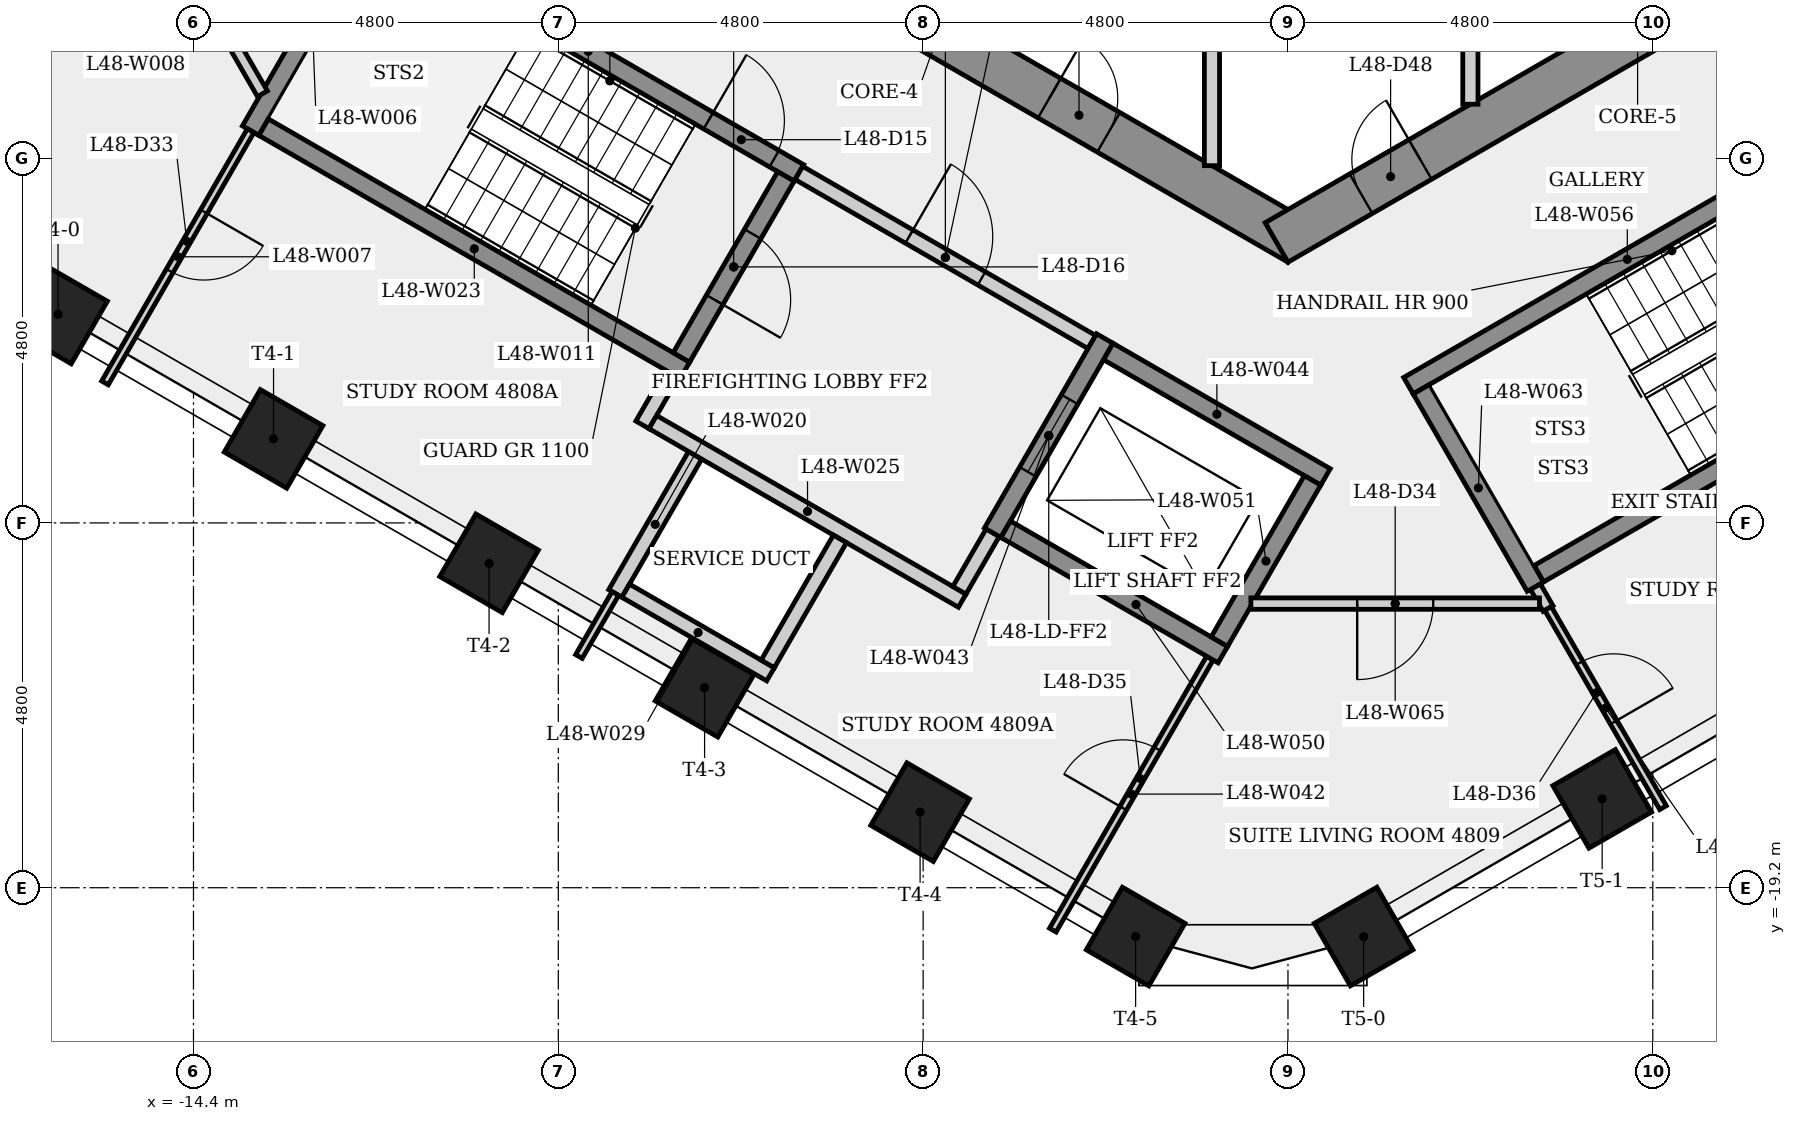
"""IFC4 building model, lengths in metres.
Left out: names, types, materials, properties, quantities, classifications, styles, units other than length and angle.
Written with IfcOpenShell. Run it as: python <this file> out.ifc"""

import sys

from ifc_helpers import new_model, si_unit, direction, frame, frame_2d, origin, origin_2d, place, context, subcontext, project, spatial, rectangle, extrude, element, fill, save


model = new_model("IFC4")
c1 = context("Model", 3, precision=1e-05, world=origin(), true_north=direction((0.0, 1.0)))
c2 = subcontext(c1, "Body", "Model", "MODEL_VIEW")
j1 = project(units=[si_unit("LENGTHUNIT", "METRE"), si_unit("PLANEANGLEUNIT", "RADIAN")], contexts=[c1])
p1 = place(None, origin())
s1 = spatial("IfcSite", under=j1, at=p1, CompositionType="ELEMENT")
p2 = place(p1, origin())
s2 = spatial("IfcBuilding", under=s1, at=p2, CompositionType="ELEMENT")
p3 = place(p2, frame((0.0, 0.0, 179.9)))
s3 = spatial("IfcBuildingStorey", under=s2, at=p3, CompositionType="ELEMENT", Elevation=179.9)
p4 = place(p3, frame((-9.35, -5.225, 0.0), z_axis=(0.0, 0.0, 1.0), x_axis=(0.866023993627, -0.500002442456, 0.0)))
e1 = element("IfcWall", 1, at=p4, inside=s3, PredefinedType="SHEAR", context=c2, shape_type="SweptSolid", body=[
    extrude(rectangle(XDim=10.97, YDim=0.6, at=frame_2d((5.485, 0.0))), origin(), (0.0, 0.0, 1.0), 3.4),
])
p5 = place(p4, frame((2.622, 0.0, 0.0)))
e2 = element("IfcOpeningElement", 2, at=p5, cuts=e1, PredefinedType="OPENING", context=c2, shape_type="SweptSolid", body=[
    extrude(rectangle(XDim=0.9, YDim=2.1, at=frame_2d((0.45, 1.05))), frame((0.0, 0.31, 0.0), z_axis=(0.0, -1.0, 0.0), x_axis=(1.0, 0.0, 0.0)), (0.0, 0.0, 1.0), 0.62),
])
p6 = place(p4, frame((7.172, 0.0, 0.0)))
e3 = element("IfcOpeningElement", 3, at=p6, cuts=e1, PredefinedType="OPENING", context=c2, shape_type="SweptSolid", body=[
    extrude(rectangle(XDim=0.9, YDim=2.1, at=frame_2d((0.45, 1.05))), frame((0.0, 0.31, 0.0), z_axis=(0.0, -1.0, 0.0), x_axis=(1.0, 0.0, 0.0)), (0.0, 0.0, 1.0), 0.62),
])
p7 = place(p3, frame((-0.15, -10.71, 0.0), z_axis=(0.0, 0.0, 1.0), x_axis=(0.866023993627, 0.500002442456, 0.0)))
e4 = element("IfcWall", 4, at=p7, inside=s3, PredefinedType="SHEAR", context=c2, shape_type="SweptSolid", body=[
    extrude(rectangle(XDim=10.97, YDim=0.6, at=frame_2d((5.485, 0.0))), origin(), (0.0, 0.0, 1.0), 3.4),
])
p8 = place(p7, frame((1.283, 0.0, 0.0)))
e5 = element("IfcOpeningElement", 5, at=p8, cuts=e4, PredefinedType="OPENING", context=c2, shape_type="SweptSolid", body=[
    extrude(rectangle(XDim=0.9, YDim=2.1, at=frame_2d((0.45, 1.05))), frame((0.0, 0.31, 0.0), z_axis=(0.0, -1.0, 0.0), x_axis=(1.0, 0.0, 0.0)), (0.0, 0.0, 1.0), 0.62),
])
p9 = place(p7, frame((8.09, 0.0, 0.0)))
e6 = element("IfcOpeningElement", 6, at=p9, cuts=e4, PredefinedType="OPENING", context=c2, shape_type="SweptSolid", body=[
    extrude(rectangle(XDim=0.9, YDim=2.1, at=frame_2d((0.45, 1.05))), frame((0.0, 0.31, 0.0), z_axis=(0.0, -1.0, 0.0), x_axis=(1.0, 0.0, 0.0)), (0.0, 0.0, 1.0), 0.62),
])
for number, where, z_axis, x_axis in (
    (7, (-16.182, -11.657, 0.0), (0.0, 0.0, 1.0), (-0.5, -0.866, 0.0)),
    (8, (-13.346, -13.294, 0.0), (0.0, 0.0, 1.0), (-0.5, -0.866, 0.0)),
    (9, (-10.511, -14.931, 0.0), (0.0, 0.0, 1.0), (-0.5, -0.866, 0.0)),
    (10, (-7.676, -16.569, 0.0), (0.0, 0.0, 1.0), (-0.5, -0.866, 0.0)),
    (11, (-4.84, -18.206, 0.0), (0.0, 0.0, 1.0), (-0.5, -0.866, 0.0)),
    (12, (-2.004, -19.843, 0.0), (0.0, 0.0, 1.0), (-0.5, -0.866, 0.0)),
    (13, (0.996, -19.843, 0.0), (0.0, 0.0, 1.0), (0.5, -0.866, 0.0)),
    (14, (4.134, -18.031, 0.0), (0.0, 0.0, 1.0), (0.5, -0.866, 0.0)),
):
    element("IfcColumn", number, at=place(p3, frame(where, z_axis=z_axis, x_axis=x_axis)), inside=s3, PredefinedType="COLUMN", context=c2, shape_type="SweptSolid", body=[
        extrude(rectangle(XDim=0.95, YDim=0.95, at=origin_2d()), origin(), (0.0, 0.0, 1.0), 3.4),
    ])
p10 = place(p3, frame((-13.648, -9.239, 0.0), z_axis=(0.0, 0.0, 1.0), x_axis=(0.500017246033, 0.866015446554, 0.0)))
e15 = element("IfcWall", 15, at=p10, inside=s3, PredefinedType="SHEAR", context=c2, shape_type="SweptSolid", body=[
    extrude(rectangle(XDim=3.25, YDim=0.25, at=frame_2d((1.625, 0.0))), origin(), (0.0, 0.0, 1.0), 3.05),
])
p11 = place(p3, frame((-13.648, -9.239, 0.0), z_axis=(0.0, 0.0, 1.0), x_axis=(-0.500044099915, -0.86599994119, 0.0)))
e16 = element("IfcWall", 16, at=p11, inside=s3, PredefinedType="PARTITIONING", context=c2, shape_type="SweptSolid", body=[
    extrude(rectangle(XDim=3.833, YDim=0.1, at=frame_2d((1.917, 0.0))), origin(), (0.0, 0.0, 1.0), 3.05),
])
p12 = place(p11, frame((1.231, 0.0, 0.0)))
e17 = element("IfcOpeningElement", 17, at=p12, cuts=e16, PredefinedType="OPENING", context=c2, shape_type="SweptSolid", body=[
    extrude(rectangle(XDim=0.9, YDim=2.1, at=frame_2d((0.45, 1.05))), frame((0.0, 0.06, 0.0), z_axis=(0.0, -1.0, 0.0), x_axis=(1.0, 0.0, 0.0)), (0.0, 0.0, 1.0), 0.12),
])
p13 = place(p3, frame((-13.493, -8.753, 0.0), z_axis=(0.0, 0.0, 1.0), x_axis=(-0.500006623535, 0.866021579651, 0.0)))
e18 = element("IfcWall", 18, at=p13, inside=s3, PredefinedType="PARTITIONING", context=c2, shape_type="SweptSolid", body=[
    extrude(rectangle(XDim=3.768, YDim=0.15, at=frame_2d((1.884, 0.0))), origin(), (0.0, 0.0, 1.0), 3.05),
])
p14 = place(p13, frame((1.384, 0.0, 0.0)))
e19 = element("IfcOpeningElement", 19, at=p14, cuts=e18, PredefinedType="OPENING", context=c2, shape_type="SweptSolid", body=[
    extrude(rectangle(XDim=1.0, YDim=2.1, at=frame_2d((0.5, 1.05))), frame((0.0, 0.085, 0.0), z_axis=(0.0, -1.0, 0.0), x_axis=(1.0, 0.0, 0.0)), (0.0, 0.0, 1.0), 0.17),
])
p15 = place(p3, frame((-11.977, -6.595, 0.0), z_axis=(0.0, 0.0, 1.0), x_axis=(0.866025499775, -0.499999833739, 0.0)))
e20 = element("IfcWall", 20, at=p15, inside=s3, PredefinedType="SHEAR", context=c2, shape_type="SweptSolid", body=[
    extrude(rectangle(XDim=6.4, YDim=0.25, at=frame_2d((3.2, 0.0))), origin(), (0.0, 0.0, 1.0), 3.05),
])
p16 = place(p15, frame((5.025, 0.0, 0.0)))
e21 = element("IfcOpeningElement", 21, at=p16, cuts=e20, PredefinedType="OPENING", context=c2, shape_type="SweptSolid", body=[
    extrude(rectangle(XDim=1.0, YDim=2.1, at=frame_2d((0.5, 1.05))), frame((0.0, 0.135, 0.0), z_axis=(0.0, -1.0, 0.0), x_axis=(1.0, 0.0, 0.0)), (0.0, 0.0, 1.0), 0.27),
])
p17 = place(p3, frame((-8.85, -15.329, 0.0), z_axis=(0.0, 0.0, 1.0), x_axis=(0.500027713859, 0.866009402589, 0.0)))
e22 = element("IfcWall", 22, at=p17, inside=s3, PredefinedType="PLUMBINGWALL", context=c2, shape_type="SweptSolid", body=[
    extrude(rectangle(XDim=2.1, YDim=0.2, at=frame_2d((1.05, 0.0))), origin(), (0.0, 0.0, 1.0), 3.05),
])
p18 = place(p3, frame((-8.493, -13.11, 0.0), z_axis=(0.0, 0.0, 1.0), x_axis=(0.500067724834, 0.865986299303, 0.0)))
e23 = element("IfcWall", 23, at=p18, inside=s3, PredefinedType="PARTITIONING", context=c2, shape_type="SweptSolid", body=[
    extrude(rectangle(XDim=0.775, YDim=0.2, at=frame_2d((0.388, 0.0))), origin(), (0.0, 0.0, 1.0), 3.05),
])
p19 = place(p3, frame((-7.935, -12.393, 0.0), z_axis=(0.0, 0.0, 1.0), x_axis=(-0.866025499775, 0.499999833739, 0.0)))
e24 = element("IfcWall", 24, at=p19, inside=s3, PredefinedType="SHEAR", context=c2, shape_type="SweptSolid", body=[
    extrude(rectangle(XDim=6.4, YDim=0.25, at=frame_2d((3.2, 0.0))), origin(), (0.0, 0.0, 1.0), 3.05),
])
p20 = place(p3, frame((-9.329, -16.158, 0.0), z_axis=(0.0, 0.0, 1.0), x_axis=(0.499950501706, 0.866053979752, 0.0)))
e25 = element("IfcWall", 25, at=p20, inside=s3, PredefinedType="PARTITIONING", context=c2, shape_type="SweptSolid", body=[
    extrude(rectangle(XDim=0.958, YDim=0.1, at=frame_2d((0.479, 0.0))), origin(), (0.0, 0.0, 1.0), 3.05),
])
p21 = place(p3, frame((-8.356, -13.073, 0.0), z_axis=(0.0, 0.0, 1.0), x_axis=(0.866038532462, -0.499977259774, 0.0)))
e26 = element("IfcWall", 26, at=p21, inside=s3, PredefinedType="PARTITIONING", context=c2, shape_type="SweptSolid", body=[
    extrude(rectangle(XDim=4.7, YDim=0.2, at=frame_2d((2.35, 0.0))), origin(), (0.0, 0.0, 1.0), 3.05),
])
p22 = place(p3, frame((-6.808, -16.392, 0.0), z_axis=(0.0, 0.0, 1.0), x_axis=(-0.866008176907, 0.50002983664, 0.0)))
e27 = element("IfcWall", 27, at=p22, inside=s3, PredefinedType="PLUMBINGWALL", context=c2, shape_type="SweptSolid", body=[
    extrude(rectangle(XDim=2.2, YDim=0.2, at=frame_2d((1.1, 0.0))), origin(), (0.0, 0.0, 1.0), 3.05),
])
p23 = place(p3, frame((-6.605, -9.841, 0.0), z_axis=(0.0, 0.0, 1.0), x_axis=(-0.499996545922, -0.866027397988, 0.0)))
e28 = element("IfcWall", 28, at=p23, inside=s3, PredefinedType="SHEAR", context=c2, shape_type="SweptSolid", body=[
    extrude(rectangle(XDim=2.75, YDim=0.25, at=frame_2d((1.375, 0.0))), origin(), (0.0, 0.0, 1.0), 3.05),
])
p24 = place(p23, frame((0.875, 0.0, 0.0)))
e29 = element("IfcOpeningElement", 29, at=p24, cuts=e28, PredefinedType="OPENING", context=c2, shape_type="SweptSolid", body=[
    extrude(rectangle(XDim=1.0, YDim=2.1, at=frame_2d((0.5, 1.05))), frame((0.0, 0.135, 0.0), z_axis=(0.0, -1.0, 0.0), x_axis=(1.0, 0.0, 0.0)), (0.0, 0.0, 1.0), 0.27),
])
p25 = place(p3, frame((-6.435, -9.795, 0.0), z_axis=(0.0, 0.0, 1.0), x_axis=(0.866012907634, -0.500021643343, 0.0)))
e30 = element("IfcWall", 30, at=p25, inside=s3, PredefinedType="PARTITIONING", context=c2, shape_type="SweptSolid", body=[
    extrude(rectangle(XDim=4.45, YDim=0.2, at=frame_2d((2.225, 0.0))), origin(), (0.0, 0.0, 1.0), 3.05),
])
p26 = place(p25, frame((1.675, 0.0, 0.0)))
e31 = element("IfcOpeningElement", 31, at=p26, cuts=e30, PredefinedType="OPENING", context=c2, shape_type="SweptSolid", body=[
    extrude(rectangle(XDim=1.1, YDim=2.1, at=frame_2d((0.55, 1.05))), frame((0.0, 0.11, 0.0), z_axis=(0.0, -1.0, 0.0), x_axis=(1.0, 0.0, 0.0)), (0.0, 0.0, 1.0), 0.22),
])
p27 = place(p3, frame((-5.895, -14.61, 0.0), z_axis=(0.0, 0.0, 1.0), x_axis=(-0.500022797313, -0.86601224135, 0.0)))
e32 = element("IfcWall", 32, at=p27, inside=s3, PredefinedType="PLUMBINGWALL", context=c2, shape_type="SweptSolid", body=[
    extrude(rectangle(XDim=1.9, YDim=0.2, at=frame_2d((0.95, 0.0))), origin(), (0.0, 0.0, 1.0), 3.05),
])
p28 = place(p3, frame((-3.885, -14.529, 0.0), z_axis=(0.0, 0.0, 1.0), x_axis=(-0.499859285417, -0.866106630146, 0.0)))
e33 = element("IfcWall", 33, at=p28, inside=s3, PredefinedType="PARTITIONING", context=c2, shape_type="SweptSolid", body=[
    extrude(rectangle(XDim=0.875, YDim=0.2, at=frame_2d((0.438, 0.0))), origin(), (0.0, 0.0, 1.0), 3.05),
])
p29 = place(p3, frame((-3.094, -19.758, 0.0), z_axis=(0.0, 0.0, 1.0), x_axis=(0.500027577057, 0.866009481578, 0.0)))
e34 = element("IfcWall", 34, at=p29, inside=s3, PredefinedType="PARTITIONING", context=c2, shape_type="SweptSolid", body=[
    extrude(rectangle(XDim=4.133, YDim=0.1, at=frame_2d((2.066, 0.0))), origin(), (0.0, 0.0, 1.0), 3.05),
])
p30 = place(p29, frame((1.852, 0.0, 0.0)))
e35 = element("IfcOpeningElement", 35, at=p30, cuts=e34, PredefinedType="OPENING", context=c2, shape_type="SweptSolid", body=[
    extrude(rectangle(XDim=0.9, YDim=2.1, at=frame_2d((0.45, 1.05))), frame((0.0, 0.06, 0.0), z_axis=(0.0, -1.0, 0.0), x_axis=(1.0, 0.0, 0.0)), (0.0, 0.0, 1.0), 0.12),
])
p31 = place(p3, frame((-2.41, -11.974, 0.0), z_axis=(0.0, 0.0, 1.0), x_axis=(-0.500001826776, -0.866024349092, 0.0)))
e36 = element("IfcWall", 36, at=p31, inside=s3, PredefinedType="SHEAR", context=c2, shape_type="SweptSolid", body=[
    extrude(rectangle(XDim=2.95, YDim=0.25, at=frame_2d((1.475, 0.0))), origin(), (0.0, 0.0, 1.0), 3.05),
])
p32 = place(p31, frame((0.925, 0.0, 0.0)))
e37 = element("IfcOpeningElement", 37, at=p32, cuts=e36, PredefinedType="OPENING", context=c2, shape_type="SweptSolid", body=[
    extrude(rectangle(XDim=1.1, YDim=2.1, at=frame_2d((0.55, 1.05))), frame((0.0, 0.135, 0.0), z_axis=(0.0, -1.0, 0.0), x_axis=(1.0, 0.0, 0.0)), (0.0, 0.0, 1.0), 0.27),
])
p33 = place(p3, frame((-2.364, -12.145, 0.0), z_axis=(0.0, 0.0, 1.0), x_axis=(0.866040211805, -0.499974350878, 0.0)))
e38 = element("IfcWall", 38, at=p33, inside=s3, PredefinedType="SHEAR", context=c2, shape_type="SweptSolid", body=[
    extrude(rectangle(XDim=3.3, YDim=0.25, at=frame_2d((1.65, 0.0))), origin(), (0.0, 0.0, 1.0), 3.05),
])
p34 = place(p3, frame((-1.0, -5.25, 0.0), z_axis=(0.0, 0.0, 1.0), x_axis=(0.0, -1.0, 0.0)))
e39 = element("IfcWall", 39, at=p34, inside=s3, PredefinedType="PARTITIONING", context=c2, shape_type="SweptSolid", body=[
    extrude(rectangle(XDim=4.449, YDim=0.2, at=frame_2d((2.225, 0.0))), origin(), (0.0, 0.0, 1.0), 3.05),
])
p35 = place(p3, frame((-0.856, -16.133, 0.0), z_axis=(0.0, 0.0, 1.0), x_axis=(-0.866021716278, 0.500006386895, 0.0)))
e40 = element("IfcWall", 40, at=p35, inside=s3, PredefinedType="SHEAR", context=c2, shape_type="SweptSolid", body=[
    extrude(rectangle(XDim=3.3, YDim=0.25, at=frame_2d((1.65, 0.0))), origin(), (0.0, 0.0, 1.0), 3.05),
])
p36 = place(p3, frame((-0.902, -15.962, 0.0), z_axis=(0.0, 0.0, 1.0), x_axis=(0.500061746146, 0.865989751695, 0.0)))
e41 = element("IfcWall", 41, at=p36, inside=s3, PredefinedType="SHEAR", context=c2, shape_type="SweptSolid", body=[
    extrude(rectangle(XDim=2.45, YDim=0.25, at=frame_2d((1.225, 0.0))), origin(), (0.0, 0.0, 1.0), 3.4),
])
p37 = place(p3, frame((1.585, -12.595, 0.0), z_axis=(0.0, 0.0, 1.0), x_axis=(0.866036417653, 0.499980922934, 0.0)))
e42 = element("IfcWall", 42, at=p37, inside=s3, PredefinedType="SHEAR", context=c2, shape_type="SweptSolid", body=[
    extrude(rectangle(XDim=6.65, YDim=0.25, at=frame_2d((3.325, 0.0))), origin(), (0.0, 0.0, 1.0), 3.05),
])
p38 = place(p37, frame((5.275, 0.0, 0.0)))
e43 = element("IfcOpeningElement", 43, at=p38, cuts=e42, PredefinedType="OPENING", context=c2, shape_type="SweptSolid", body=[
    extrude(rectangle(XDim=1.0, YDim=2.1, at=frame_2d((0.5, 1.05))), frame((0.0, 0.135, 0.0), z_axis=(0.0, -1.0, 0.0), x_axis=(1.0, 0.0, 0.0)), (0.0, 0.0, 1.0), 0.27),
])
p39 = place(p3, frame((2.4, -5.25, 0.0), z_axis=(0.0, 0.0, 1.0), x_axis=(0.0, -1.0, 0.0)))
e44 = element("IfcWall", 44, at=p39, inside=s3, PredefinedType="PARTITIONING", context=c2, shape_type="SweptSolid", body=[
    extrude(rectangle(XDim=3.641, YDim=0.2, at=frame_2d((1.821, 0.0))), origin(), (0.0, 0.0, 1.0), 3.05),
])
p40 = place(p3, frame((3.256, -15.239, 0.0), z_axis=(0.0, 0.0, 1.0), x_axis=(0.500167465571, -0.865928695901, 0.0)))
e45 = element("IfcWall", 45, at=p40, inside=s3, PredefinedType="PARTITIONING", context=c2, shape_type="SweptSolid", body=[
    extrude(rectangle(XDim=0.333, YDim=0.15, at=frame_2d((0.166, 0.0))), origin(), (0.0, 0.0, 1.0), 3.05),
])
p41 = place(p3, frame((3.256, -15.239, 0.0), z_axis=(0.0, 0.0, 1.0), x_axis=(-0.50002537861, 0.866010750942, 0.0)))
e46 = element("IfcWall", 46, at=p41, inside=s3, PredefinedType="SHEAR", context=c2, shape_type="SweptSolid", body=[
    extrude(rectangle(XDim=3.0, YDim=0.25, at=frame_2d((1.5, 0.0))), origin(), (0.0, 0.0, 1.0), 3.05),
])
p42 = place(p3, frame((3.309, -15.462, 0.0), z_axis=(0.0, 0.0, 1.0), x_axis=(-1.0, 0.0, 0.0)))
e47 = element("IfcWall", 47, at=p42, inside=s3, PredefinedType="PARTITIONING", context=c2, shape_type="SweptSolid", body=[
    extrude(rectangle(XDim=3.797, YDim=0.15, at=frame_2d((1.899, 0.0))), origin(), (0.0, 0.0, 1.0), 3.05),
])
p43 = place(p42, frame((1.399, 0.0, 0.0)))
e48 = element("IfcOpeningElement", 48, at=p43, cuts=e47, PredefinedType="OPENING", context=c2, shape_type="SweptSolid", body=[
    extrude(rectangle(XDim=1.0, YDim=2.1, at=frame_2d((0.5, 1.05))), frame((0.0, 0.085, 0.0), z_axis=(0.0, -1.0, 0.0), x_axis=(1.0, 0.0, 0.0)), (0.0, 0.0, 1.0), 0.17),
])
p44 = place(p3, frame((3.422, -15.527, 0.0), z_axis=(0.0, 0.0, 1.0), x_axis=(0.49999255039, -0.866029704776, 0.0)))
e49 = element("IfcWall", 49, at=p44, inside=s3, PredefinedType="PARTITIONING", context=c2, shape_type="SweptSolid", body=[
    extrude(rectangle(XDim=3.025, YDim=0.1, at=frame_2d((1.513, 0.0))), origin(), (0.0, 0.0, 1.0), 3.05),
])
p45 = place(p44, frame((0.827, 0.0, 0.0)))
e50 = element("IfcOpeningElement", 50, at=p45, cuts=e49, PredefinedType="OPENING", context=c2, shape_type="SweptSolid", body=[
    extrude(rectangle(XDim=0.9, YDim=2.1, at=frame_2d((0.45, 1.05))), frame((0.0, 0.06, 0.0), z_axis=(0.0, -1.0, 0.0), x_axis=(1.0, 0.0, 0.0)), (0.0, 0.0, 1.0), 0.12),
])
p46 = place(p3, frame((3.301, -15.068, 0.0), z_axis=(0.0, 0.0, 1.0), x_axis=(0.866035036182, 0.499983315828, 0.0)))
e51 = element("IfcWall", 51, at=p46, inside=s3, PredefinedType="SHEAR", context=c2, shape_type="SweptSolid", body=[
    extrude(rectangle(XDim=6.4, YDim=0.25, at=frame_2d((3.2, 0.0))), origin(), (0.0, 0.0, 1.0), 3.05),
])
p47 = place(p16, origin())
e52 = element("IfcDoor", 52, at=p47, inside=s3, OperationType="SINGLE_SWING_LEFT", PredefinedType="DOOR", context=c2, shape_type="SweptSolid", body=[
    extrude(rectangle(XDim=1.0, YDim=2.1, at=frame_2d((0.5, 1.05))), frame((0.0, 0.025, 0.0), z_axis=(0.0, -1.0, 0.0), x_axis=(1.0, 0.0, 0.0)), (0.0, 0.0, 1.0), 0.05),
])
fill(e21, e52)
p48 = place(p24, origin())
e53 = element("IfcDoor", 53, at=p48, inside=s3, OperationType="SINGLE_SWING_RIGHT", PredefinedType="DOOR", context=c2, shape_type="SweptSolid", body=[
    extrude(rectangle(XDim=1.0, YDim=2.1, at=frame_2d((0.5, 1.05))), frame((0.0, 0.025, 0.0), z_axis=(0.0, -1.0, 0.0), x_axis=(1.0, 0.0, 0.0)), (0.0, 0.0, 1.0), 0.05),
])
fill(e29, e53)
p49 = place(p26, origin())
e54 = element("IfcDoor", 54, at=p49, inside=s3, OperationType="SINGLE_SWING_LEFT", PredefinedType="DOOR", context=c2, shape_type="SweptSolid", body=[
    extrude(rectangle(XDim=1.1, YDim=2.1, at=frame_2d((0.55, 1.05))), frame((0.0, 0.025, 0.0), z_axis=(0.0, -1.0, 0.0), x_axis=(1.0, 0.0, 0.0)), (0.0, 0.0, 1.0), 0.05),
])
fill(e31, e54)
p50 = place(p32, origin())
e55 = element("IfcDoor", 55, at=p50, inside=s3, OperationType="SLIDING_TO_LEFT", PredefinedType="DOOR", context=c2, shape_type="SweptSolid", body=[
    extrude(rectangle(XDim=1.1, YDim=2.1, at=frame_2d((0.55, 1.05))), frame((0.0, 0.025, 0.0), z_axis=(0.0, -1.0, 0.0), x_axis=(1.0, 0.0, 0.0)), (0.0, 0.0, 1.0), 0.05),
])
fill(e37, e55)
p51 = place(p12, origin())
e56 = element("IfcDoor", 56, at=p51, inside=s3, OperationType="SINGLE_SWING_LEFT", PredefinedType="DOOR", context=c2, shape_type="SweptSolid", body=[
    extrude(rectangle(XDim=0.9, YDim=2.1, at=frame_2d((0.45, 1.05))), frame((0.0, 0.025, 0.0), z_axis=(0.0, -1.0, 0.0), x_axis=(1.0, 0.0, 0.0)), (0.0, 0.0, 1.0), 0.05),
])
fill(e17, e56)
p52 = place(p43, origin())
e57 = element("IfcDoor", 57, at=p52, inside=s3, OperationType="SINGLE_SWING_RIGHT", PredefinedType="DOOR", context=c2, shape_type="SweptSolid", body=[
    extrude(rectangle(XDim=1.0, YDim=2.1, at=frame_2d((0.5, 1.05))), frame((0.0, 0.025, 0.0), z_axis=(0.0, -1.0, 0.0), x_axis=(1.0, 0.0, 0.0)), (0.0, 0.0, 1.0), 0.05),
])
fill(e48, e57)
p53 = place(p30, origin())
e58 = element("IfcDoor", 58, at=p53, inside=s3, OperationType="SINGLE_SWING_LEFT", PredefinedType="DOOR", context=c2, shape_type="SweptSolid", body=[
    extrude(rectangle(XDim=0.9, YDim=2.1, at=frame_2d((0.45, 1.05))), frame((0.0, 0.025, 0.0), z_axis=(0.0, -1.0, 0.0), x_axis=(1.0, 0.0, 0.0)), (0.0, 0.0, 1.0), 0.05),
])
fill(e35, e58)
p54 = place(p45, origin())
e59 = element("IfcDoor", 59, at=p54, inside=s3, OperationType="SINGLE_SWING_RIGHT", PredefinedType="DOOR", context=c2, shape_type="SweptSolid", body=[
    extrude(rectangle(XDim=0.9, YDim=2.1, at=frame_2d((0.45, 1.05))), frame((0.0, 0.025, 0.0), z_axis=(0.0, -1.0, 0.0), x_axis=(1.0, 0.0, 0.0)), (0.0, 0.0, 1.0), 0.05),
])
fill(e50, e59)
p55 = place(p6, origin())
e60 = element("IfcDoor", 60, at=p55, inside=s3, OperationType="SINGLE_SWING_LEFT", PredefinedType="DOOR", context=c2, shape_type="SweptSolid", body=[
    extrude(rectangle(XDim=0.9, YDim=2.1, at=frame_2d((0.45, 1.05))), frame((0.0, 0.025, 0.0), z_axis=(0.0, -1.0, 0.0), x_axis=(1.0, 0.0, 0.0)), (0.0, 0.0, 1.0), 0.05),
])
fill(e3, e60)
p56 = place(p8, origin())
e61 = element("IfcDoor", 61, at=p56, inside=s3, OperationType="SINGLE_SWING_RIGHT", PredefinedType="DOOR", context=c2, shape_type="SweptSolid", body=[
    extrude(rectangle(XDim=0.9, YDim=2.1, at=frame_2d((0.45, 1.05))), frame((0.0, 0.025, 0.0), z_axis=(0.0, -1.0, 0.0), x_axis=(1.0, 0.0, 0.0)), (0.0, 0.0, 1.0), 0.05),
])
fill(e5, e61)
save(model, sys.argv[1])
